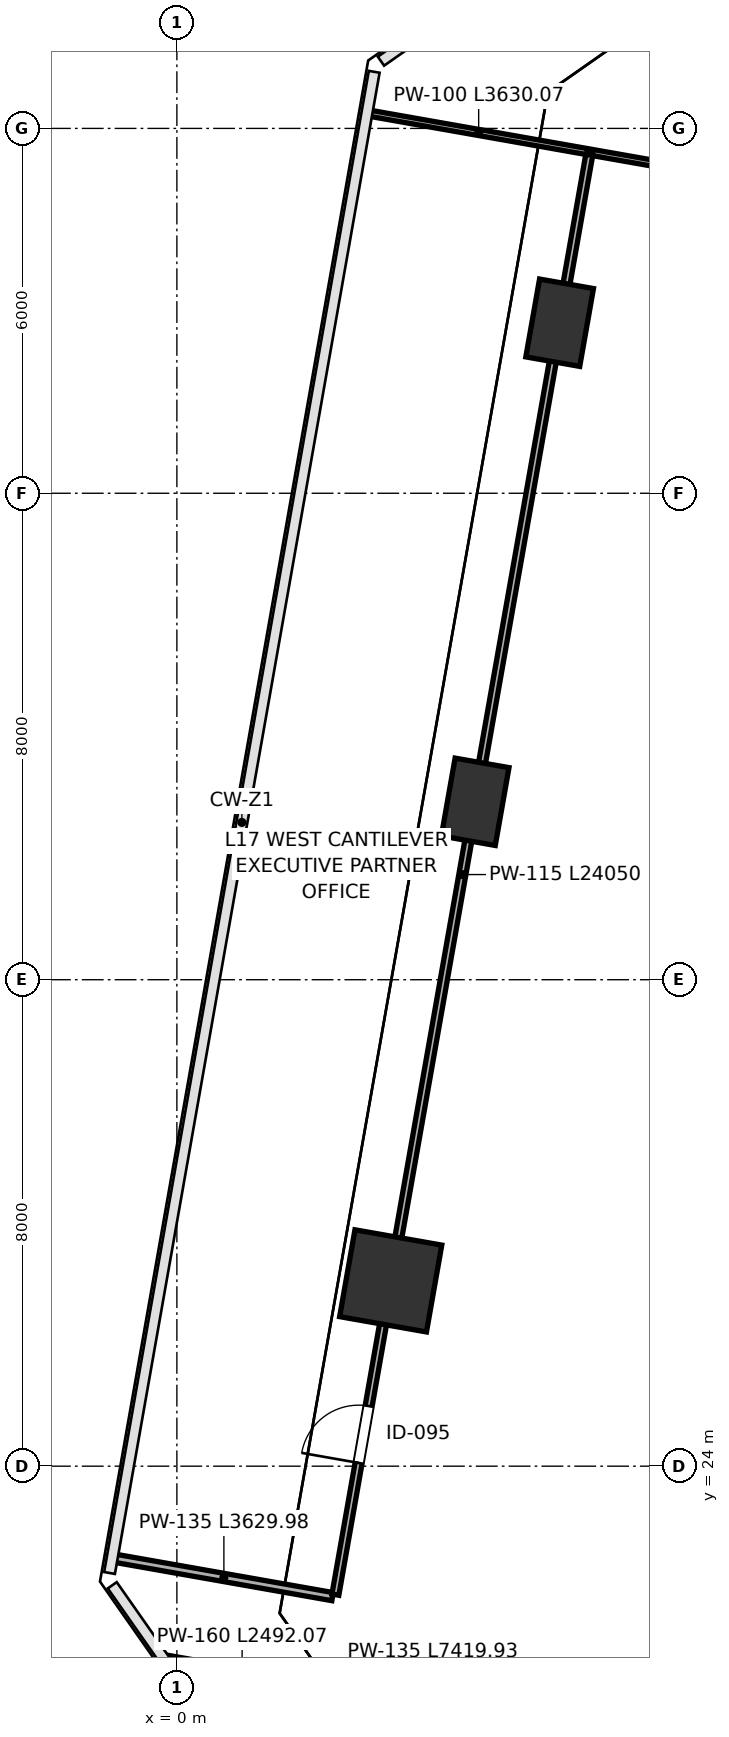
"""IFC4 building model, lengths in metres.
Left out: names, types, materials, properties, quantities, classifications, styles, units other than length and angle.
Written with IfcOpenShell. Run it as: python <this file> out.ifc"""

import sys

from ifc_helpers import new_model, si_unit, direction, frame, frame_2d, origin, origin_2d, place, context, subcontext, project, spatial, rectangle, extrude, clip, halfspace, source, transform, mapped, element, fill, save


model = new_model("IFC4")
c1 = context("Model", 3, precision=1e-05, world=origin(), true_north=direction((0.0, 1.0)))
c2 = subcontext(c1, "Body", "Model", "MODEL_VIEW")
j1 = project(units=[si_unit("LENGTHUNIT", "METRE"), si_unit("PLANEANGLEUNIT", "RADIAN")], contexts=[c1])
p1 = place(None, origin())
s1 = spatial("IfcSite", under=j1, at=p1, CompositionType="ELEMENT")
p2 = place(p1, origin())
s2 = spatial("IfcBuilding", under=s1, at=p2, CompositionType="ELEMENT")
p3 = place(p2, frame((0.0, 0.0, 79.0)))
s3 = spatial("IfcBuildingStorey", under=s2, at=p3, CompositionType="ELEMENT", Elevation=79.0)
p4 = place(p3, frame((3.517, 27.048, 0.0), z_axis=(-0.024589935751, 0.093210321163, 0.995342740511), x_axis=(0.996317794666, 0.084087091474, 0.01673956626)))
e1 = element("IfcColumn", 1, at=p4, inside=s3, PredefinedType="COLUMN", context=c2, shape_type="Clipping", body=[
    clip(clip(extrude(rectangle(XDim=1.45, YDim=1.45, at=origin_2d()), origin(), (0.0, 0.0, 1.0), 4.219), halfspace(frame((0.0, 0.0, 0.082), z_axis=(0.0, 0.0, -1.0), x_axis=(1.0, 0.0, 0.0)), False)), halfspace(frame((0.0, 0.0, 4.137), z_axis=(0.0, 0.0, 1.0), x_axis=(1.0, 0.0, 0.0)), False)),
])
p5 = place(p3, frame((4.906, 34.926, 0.0), z_axis=(0.016098412236, 0.085703777374, 0.996190596054), x_axis=(0.93594592387, -0.351818035353, 0.015142575451)))
e2 = element("IfcColumn", 2, at=p5, inside=s3, PredefinedType="PILASTER", context=c2, shape_type="Clipping", body=[
    clip(clip(extrude(rectangle(XDim=0.9, YDim=1.3, at=origin_2d()), origin(), (0.0, 0.0, 1.0), 4.216), halfspace(frame((0.0, 0.0, 0.064), z_axis=(0.0, 0.0, -1.0), x_axis=(1.0, 0.0, 0.0)), False)), halfspace(frame((0.0, 0.0, 4.152), z_axis=(0.0, 0.0, 1.0), x_axis=(1.0, 0.0, 0.0)), False)),
])
p6 = place(p3, frame((6.295, 42.804, 0.0), z_axis=(0.056701351042, 0.077993286943, 0.995340144866), x_axis=(0.69491742365, -0.718894571841, 0.016744219477)))
e3 = element("IfcColumn", 3, at=p6, inside=s3, PredefinedType="PILASTER", context=c2, shape_type="Clipping", body=[
    clip(clip(extrude(rectangle(XDim=0.9, YDim=1.3, at=origin_2d()), origin(), (0.0, 0.0, 1.0), 4.22), halfspace(frame((0.0, 0.0, 0.07), z_axis=(0.0, 0.0, -1.0), x_axis=(1.0, 0.0, 0.0)), False)), halfspace(frame((0.0, 0.0, 4.149), z_axis=(0.0, 0.0, 1.0), x_axis=(1.0, 0.0, 0.0)), False)),
])
p7 = place(p3, frame((-0.154, 20.81, 0.0), z_axis=(0.0, 0.0, 1.0), x_axis=(0.984798349436, -0.173701499557, 0.0)))
e4 = element("IfcWall", 4, at=p7, inside=s3, PredefinedType="PARTITIONING", context=c2, shape_type="SweptSolid", body=[
    extrude(rectangle(XDim=2.492, YDim=0.16, at=frame_2d((1.246, 0.0))), origin(), (0.0, 0.0, 1.0), 3.96),
])
p8 = place(p3, frame((6.83, 45.604, 0.0), z_axis=(0.0, 0.0, 1.0), x_axis=(0.984806496121, -0.173655305701, 0.0)))
e5 = element("IfcWall", 5, at=p8, inside=s3, PredefinedType="PARTITIONING", context=c2, shape_type="SweptSolid", body=[
    extrude(rectangle(XDim=25.6, YDim=0.1, at=frame_2d((12.8, 0.0))), origin(), (0.0, 0.0, 1.0), 3.96),
])
p9 = place(p8, frame((1.05, 0.0, 0.0)))
e6 = element("IfcOpeningElement", 6, at=p9, cuts=e5, PredefinedType="OPENING", context=c2, shape_type="SweptSolid", body=[
    extrude(rectangle(XDim=0.95, YDim=2.15, at=frame_2d((0.475, 1.075))), frame((0.0, 0.06, 0.0), z_axis=(0.0, -1.0, 0.0), x_axis=(1.0, 0.0, 0.0)), (0.0, 0.0, 1.0), 0.12),
])
p10 = place(p3, frame((-1.014, 22.485, 0.0), z_axis=(0.0, 0.0, 1.0), x_axis=(0.984795743306, -0.173716274326, 0.0)))
e7 = element("IfcWall", 7, at=p10, inside=s3, PredefinedType="PARTITIONING", context=c2, shape_type="SweptSolid", body=[
    extrude(rectangle(XDim=3.63, YDim=0.135, at=frame_2d((1.815, 0.0))), origin(), (0.0, 0.0, 1.0), 3.96),
])
p11 = place(p3, frame((2.607, 21.887, 0.0), z_axis=(0.0, 0.0, 1.0), x_axis=(0.173659666579, 0.984805727138, 0.0)))
e8 = element("IfcWall", 8, at=p11, inside=s3, PredefinedType="PARTITIONING", context=c2, shape_type="SweptSolid", body=[
    extrude(rectangle(XDim=24.05, YDim=0.115, at=frame_2d((12.025, 0.0))), origin(), (0.0, 0.0, 1.0), 2.795),
])
p12 = place(p11, frame((2.2, 0.0, 0.0)))
e9 = element("IfcOpeningElement", 9, at=p12, cuts=e8, PredefinedType="OPENING", context=c2, shape_type="SweptSolid", body=[
    extrude(rectangle(XDim=0.95, YDim=2.15, at=frame_2d((0.475, 1.075))), frame((0.0, 0.067, 0.0), z_axis=(0.0, -1.0, 0.0), x_axis=(1.0, 0.0, 0.0)), (0.0, 0.0, 1.0), 0.135),
])
p13 = place(p3, frame((3.176, 46.249, 0.0), z_axis=(0.0, 0.0, 1.0), x_axis=(0.984795743306, -0.173716274326, 0.0)))
e10 = element("IfcWall", 10, at=p13, inside=s3, PredefinedType="PARTITIONING", context=c2, shape_type="SweptSolid", body=[
    extrude(rectangle(XDim=3.63, YDim=0.1, at=frame_2d((1.815, 0.0))), origin(), (0.0, 0.0, 1.0), 3.96),
])
m1 = source(origin(), c2, "Body", "SweptSolid", [
    extrude(rectangle(XDim=0.95, YDim=2.15, at=frame_2d((0.475, 1.075))), frame((0.0, 0.025, 0.0), z_axis=(0.0, -1.0, 0.0), x_axis=(1.0, 0.0, 0.0)), (0.0, 0.0, 1.0), 0.05),
])
p14 = place(p12, origin())
e11 = element("IfcDoor", 11, at=p14, inside=s3, OperationType="SINGLE_SWING_LEFT", PredefinedType="DOOR", context=c2, shape_type="MappedRepresentation", body=[
    mapped(m1, transform((0.0, 0.0, 0.0), scale=1.0)),
])
fill(e9, e11)
save(model, sys.argv[1])
